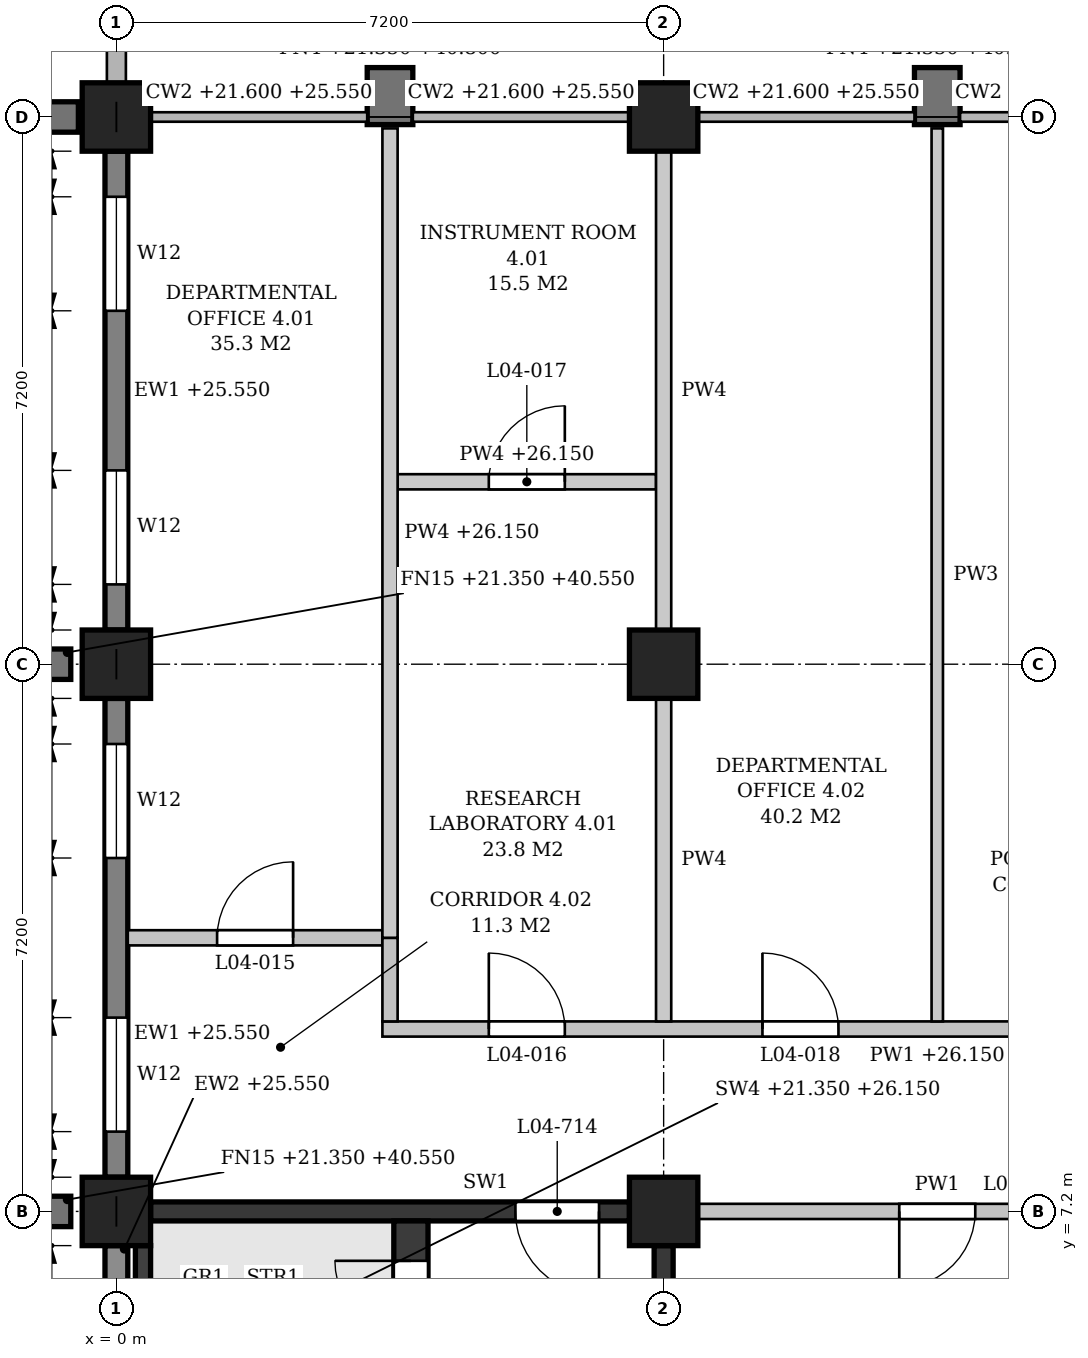
"""IFC4 building model, lengths in metres.
Left out: names, types, materials, properties, quantities, classifications, styles, units other than length and angle.
Written with IfcOpenShell. Run it as: python <this file> out.ifc"""

import sys

from ifc_helpers import new_model, si_unit, direction, frame, frame_2d, origin, origin_2d, place, context, subcontext, project, spatial, polyline, rectangle, outline, extrude, element, fill, save


model = new_model("IFC4")
c1 = context("Model", 3, precision=1e-05, world=origin(), true_north=direction((0.0, 1.0)))
c2 = subcontext(c1, "Body", "Model", "MODEL_VIEW")
j1 = project(units=[si_unit("LENGTHUNIT", "METRE"), si_unit("PLANEANGLEUNIT", "RADIAN")], contexts=[c1])
p1 = place(None, origin())
s1 = spatial("IfcSite", under=j1, at=p1, CompositionType="ELEMENT")
p2 = place(p1, origin())
s2 = spatial("IfcBuilding", under=s1, at=p2, CompositionType="ELEMENT")
p3 = place(p2, frame((0.0, 0.0, 21.6)))
s3 = spatial("IfcBuildingStorey", under=s2, at=p3, CompositionType="ELEMENT", Elevation=21.6)
for number, where, z_axis, x_axis in (
    (1, (0.0, 7.2, 0.0), (0.0, 0.0, 1.0), (1.0, 0.0, 0.0)),
    (2, (0.0, 14.4, 0.0), (0.0, 0.0, 1.0), (1.0, 0.0, 0.0)),
    (3, (0.0, 21.6, 0.0), (0.0, 0.0, 1.0), (1.0, 0.0, 0.0)),
    (4, (7.2, 7.2, 0.0), (0.0, 0.0, 1.0), (1.0, 0.0, 0.0)),
    (5, (7.2, 14.4, 0.0), (0.0, 0.0, 1.0), (1.0, 0.0, 0.0)),
    (6, (7.2, 21.6, 0.0), (0.0, 0.0, 1.0), (1.0, 0.0, 0.0)),
):
    element("IfcColumn", number, at=place(p3, frame(where, z_axis=z_axis, x_axis=x_axis)), inside=s3, PredefinedType="COLUMN", context=c2, shape_type="SweptSolid", body=[
        extrude(rectangle(XDim=0.9, YDim=0.9, at=origin_2d()), origin(), (0.0, 0.0, 1.0), 4.8),
    ])
p4 = place(p3, frame((0.0, 0.45, 0.0), z_axis=(0.0, 0.0, 1.0), x_axis=(0.0, 1.0, 0.0)))
e7 = element("IfcWall", 7, at=p4, inside=s3, PredefinedType="STANDARD", context=c2, shape_type="SweptSolid", body=[
    extrude(rectangle(XDim=6.3, YDim=0.3, at=frame_2d((3.15, 0.0))), origin(), (0.0, 0.0, 1.0), 3.95),
])
p5 = place(p4, frame((0.9, 0.0, 0.9)))
e8 = element("IfcOpeningElement", 8, at=p5, cuts=e7, PredefinedType="OPENING", context=c2, shape_type="SweptSolid", body=[
    extrude(outline(polyline([(0.0, 0.0), (0.9, 0.0), (0.9, 2.05), (0.45, 2.5), (0.0, 2.05), (0.0, 0.0)])), frame((0.0, 0.16, 0.0), z_axis=(0.0, -1.0, 0.0), x_axis=(1.0, 0.0, 0.0)), (0.0, 0.0, 1.0), 0.32),
])
p6 = place(p4, frame((4.5, 0.0, 0.9)))
e9 = element("IfcOpeningElement", 9, at=p6, cuts=e7, PredefinedType="OPENING", context=c2, shape_type="SweptSolid", body=[
    extrude(outline(polyline([(0.0, 0.0), (0.9, 0.0), (0.9, 2.05), (0.45, 2.5), (0.0, 2.05), (0.0, 0.0)])), frame((0.0, 0.16, 0.0), z_axis=(0.0, -1.0, 0.0), x_axis=(1.0, 0.0, 0.0)), (0.0, 0.0, 1.0), 0.32),
])
p7 = place(p3, frame((0.0, 7.65, 0.0), z_axis=(0.0, 0.0, 1.0), x_axis=(0.0, 1.0, 0.0)))
e10 = element("IfcWall", 10, at=p7, inside=s3, PredefinedType="STANDARD", context=c2, shape_type="SweptSolid", body=[
    extrude(rectangle(XDim=6.3, YDim=0.3, at=frame_2d((3.15, 0.0))), origin(), (0.0, 0.0, 1.0), 3.95),
])
p8 = place(p7, frame((0.6, 0.0, 0.9)))
e11 = element("IfcOpeningElement", 11, at=p8, cuts=e10, PredefinedType="OPENING", context=c2, shape_type="SweptSolid", body=[
    extrude(outline(polyline([(0.0, 0.0), (1.5, 0.0), (1.5, 1.75), (0.75, 2.5), (0.0, 1.75), (0.0, 0.0)])), frame((0.0, 0.16, 0.0), z_axis=(0.0, -1.0, 0.0), x_axis=(1.0, 0.0, 0.0)), (0.0, 0.0, 1.0), 0.32),
])
p9 = place(p7, frame((4.2, 0.0, 0.9)))
e12 = element("IfcOpeningElement", 12, at=p9, cuts=e10, PredefinedType="OPENING", context=c2, shape_type="SweptSolid", body=[
    extrude(outline(polyline([(0.0, 0.0), (1.5, 0.0), (1.5, 1.75), (0.75, 2.5), (0.0, 1.75), (0.0, 0.0)])), frame((0.0, 0.16, 0.0), z_axis=(0.0, -1.0, 0.0), x_axis=(1.0, 0.0, 0.0)), (0.0, 0.0, 1.0), 0.32),
])
p10 = place(p3, frame((0.0, 14.85, 0.0), z_axis=(0.0, 0.0, 1.0), x_axis=(0.0, 1.0, 0.0)))
e13 = element("IfcWall", 13, at=p10, inside=s3, PredefinedType="STANDARD", context=c2, shape_type="SweptSolid", body=[
    extrude(rectangle(XDim=6.3, YDim=0.3, at=frame_2d((3.15, 0.0))), origin(), (0.0, 0.0, 1.0), 3.95),
])
p11 = place(p10, frame((0.6, 0.0, 0.9)))
e14 = element("IfcOpeningElement", 14, at=p11, cuts=e13, PredefinedType="OPENING", context=c2, shape_type="SweptSolid", body=[
    extrude(outline(polyline([(0.0, 0.0), (1.5, 0.0), (1.5, 1.75), (0.75, 2.5), (0.0, 1.75), (0.0, 0.0)])), frame((0.0, 0.16, 0.0), z_axis=(0.0, -1.0, 0.0), x_axis=(1.0, 0.0, 0.0)), (0.0, 0.0, 1.0), 0.32),
])
p12 = place(p10, frame((4.2, 0.0, 0.9)))
e15 = element("IfcOpeningElement", 15, at=p12, cuts=e13, PredefinedType="OPENING", context=c2, shape_type="SweptSolid", body=[
    extrude(outline(polyline([(0.0, 0.0), (1.5, 0.0), (1.5, 1.75), (0.75, 2.5), (0.0, 1.75), (0.0, 0.0)])), frame((0.0, 0.16, 0.0), z_axis=(0.0, -1.0, 0.0), x_axis=(1.0, 0.0, 0.0)), (0.0, 0.0, 1.0), 0.32),
])
for number, where, z_axis, x_axis in (
    (16, (10.8, 21.5, -0.25), (0.0, 0.0, 1.0), (0.0, 1.0, 0.0)),
    (17, (3.6, 21.5, -0.25), (0.0, 0.0, 1.0), (0.0, 1.0, 0.0)),
):
    element("IfcWall", number, at=place(p3, frame(where, z_axis=z_axis, x_axis=x_axis)), inside=s3, PredefinedType="POLYGONAL", context=c2, shape_type="SweptSolid", body=[
        extrude(outline(polyline([(0.75, 0.0), (0.75, 19.0), (0.45, 19.45), (0.3, 19.45), (0.3, 18.6), (0.0, 18.6), (0.0, 14.65), (0.35, 14.65), (0.35, 13.8), (0.0, 13.8), (0.0, 9.85), (0.35, 9.85), (0.35, 9.0), (0.0, 9.0), (0.0, 5.05), (0.35, 5.05), (0.35, 4.2), (0.0, 4.2), (0.0, 0.25), (0.35, 0.25), (0.35, 0.0), (0.75, 0.0)])), frame((0.0, 0.3, 0.0), z_axis=(0.0, -1.0, 0.0), x_axis=(1.0, 0.0, 0.0)), (0.0, 0.0, 1.0), 0.6),
    ])
for number, where, z_axis, x_axis in (
    (18, (-0.6, 7.2, -0.25), (0.0, 0.0, 1.0), (-1.0, 0.0, 0.0)),
    (19, (-0.6, 14.4, -0.25), (0.0, 0.0, 1.0), (-1.0, 0.0, 0.0)),
):
    element("IfcWall", number, at=place(p3, frame(where, z_axis=z_axis, x_axis=x_axis)), inside=s3, PredefinedType="POLYGONAL", context=c2, shape_type="SweptSolid", body=[
        extrude(outline(polyline([(0.85, 0.0), (0.85, 18.9), (0.65, 19.2), (0.0, 19.2), (0.0, 0.0), (0.85, 0.0)])), frame((0.0, 0.2, 0.0), z_axis=(0.0, -1.0, 0.0), x_axis=(1.0, 0.0, 0.0)), (0.0, 0.0, 1.0), 0.4),
    ])
p13 = place(p3, frame((-0.5, 21.6, -0.25), z_axis=(0.0, 0.0, 1.0), x_axis=(-1.0, 0.0, 0.0)))
e20 = element("IfcWall", 20, at=p13, inside=s3, PredefinedType="POLYGONAL", context=c2, shape_type="SweptSolid", body=[
    extrude(outline(polyline([(0.6, 0.0), (0.6, 19.125), (0.55, 19.2), (0.0, 19.2), (0.0, 0.0), (0.6, 0.0)])), frame((0.0, 0.2, 0.0), z_axis=(0.0, -1.0, 0.0), x_axis=(1.0, 0.0, 0.0)), (0.0, 0.0, 1.0), 0.4),
])
p14 = place(p3, frame((0.45, 7.2, 0.0), z_axis=(0.0, 0.0, 1.0), x_axis=(1.0, 0.0, 0.0)))
e21 = element("IfcWall", 21, at=p14, inside=s3, PredefinedType="SHEAR", context=c2, shape_type="SweptSolid", body=[
    extrude(rectangle(XDim=6.3, YDim=0.25, at=frame_2d((3.15, 0.0))), origin(), (0.0, 0.0, 1.0), 3.8),
])
p15 = place(p14, frame((4.8, 0.0, 0.0)))
e22 = element("IfcOpeningElement", 22, at=p15, cuts=e21, PredefinedType="OPENING", context=c2, shape_type="SweptSolid", body=[
    extrude(rectangle(XDim=1.1, YDim=2.1, at=frame_2d((0.55, 1.05))), frame((0.0, 0.135, 0.0), z_axis=(0.0, -1.0, 0.0), x_axis=(1.0, 0.0, 0.0)), (0.0, 0.0, 1.0), 0.27),
])
p16 = place(p3, frame((7.2, 0.45, 0.0), z_axis=(0.0, 0.0, 1.0), x_axis=(0.0, 1.0, 0.0)))
e23 = element("IfcWall", 23, at=p16, inside=s3, PredefinedType="SHEAR", context=c2, shape_type="SweptSolid", body=[
    extrude(rectangle(XDim=6.3, YDim=0.25, at=frame_2d((3.15, 0.0))), origin(), (0.0, 0.0, 1.0), 3.8),
])
p17 = place(p3, frame((0.35, 5.85, -0.25), z_axis=(0.0, 0.0, 1.0), x_axis=(0.0, 1.0, 0.0)))
e24 = element("IfcWall", 24, at=p17, inside=s3, PredefinedType="SHEAR", context=c2, shape_type="SweptSolid", body=[
    extrude(rectangle(XDim=0.9, YDim=0.2, at=frame_2d((0.45, 0.0))), origin(), (0.0, 0.0, 1.0), 4.8),
])
p18 = place(p3, frame((3.875, 0.225, 0.0), z_axis=(0.0, 0.0, 1.0), x_axis=(0.0, 1.0, 0.0)))
e25 = element("IfcWall", 25, at=p18, inside=s3, PredefinedType="SHEAR", context=c2, shape_type="SweptSolid", body=[
    extrude(rectangle(XDim=6.85, YDim=0.45, at=frame_2d((3.425, 0.0))), origin(), (0.0, 0.0, 1.0), 4.55),
])
p19 = place(p18, frame((5.325, 0.0, 0.0)))
e26 = element("IfcOpeningElement", 26, at=p19, cuts=e25, PredefinedType="OPENING", context=c2, shape_type="SweptSolid", body=[
    extrude(rectangle(XDim=1.0, YDim=2.1, at=frame_2d((0.5, 1.05))), frame((0.0, 0.235, 0.0), z_axis=(0.0, -1.0, 0.0), x_axis=(1.0, 0.0, 0.0)), (0.0, 0.0, 1.0), 0.47),
])
p20 = place(p3, frame((7.65, 7.2, 0.0), z_axis=(0.0, 0.0, 1.0), x_axis=(1.0, 0.0, 0.0)))
e27 = element("IfcWall", 27, at=p20, inside=s3, PredefinedType="PARTITIONING", context=c2, shape_type="SweptSolid", body=[
    extrude(rectangle(XDim=6.3, YDim=0.2, at=frame_2d((3.15, 0.0))), origin(), (0.0, 0.0, 1.0), 3.8),
])
p21 = place(p20, frame((2.65, 0.0, 0.0)))
e28 = element("IfcOpeningElement", 28, at=p21, cuts=e27, PredefinedType="OPENING", context=c2, shape_type="SweptSolid", body=[
    extrude(rectangle(XDim=1.0, YDim=2.1, at=frame_2d((0.5, 1.05))), frame((0.0, 0.11, 0.0), z_axis=(0.0, -1.0, 0.0), x_axis=(1.0, 0.0, 0.0)), (0.0, 0.0, 1.0), 0.22),
])
p22 = place(p3, frame((3.5, 9.6, 0.0), z_axis=(0.0, 0.0, 1.0), x_axis=(1.0, 0.0, 0.0)))
e29 = element("IfcWall", 29, at=p22, inside=s3, PredefinedType="PARTITIONING", context=c2, shape_type="SweptSolid", body=[
    extrude(outline(polyline([(0.0, 0.0), (14.6, 0.0), (14.6, 4.55), (11.15, 4.55), (11.15, 3.8), (10.65, 3.8), (10.65, 4.55), (3.95, 4.55), (3.95, 3.8), (3.45, 3.8), (3.45, 4.55), (0.0, 4.55), (0.0, 0.0)])), frame((0.0, 0.1, 0.0), z_axis=(0.0, -1.0, 0.0), x_axis=(1.0, 0.0, 0.0)), (0.0, 0.0, 1.0), 0.2),
])
p23 = place(p22, frame((1.4, 0.0, 0.0)))
e30 = element("IfcOpeningElement", 30, at=p23, cuts=e29, PredefinedType="OPENING", context=c2, shape_type="SweptSolid", body=[
    extrude(rectangle(XDim=1.0, YDim=2.1, at=frame_2d((0.5, 1.05))), frame((0.0, 0.11, 0.0), z_axis=(0.0, -1.0, 0.0), x_axis=(1.0, 0.0, 0.0)), (0.0, 0.0, 1.0), 0.22),
])
p24 = place(p22, frame((5.0, 0.0, 0.0)))
e31 = element("IfcOpeningElement", 31, at=p24, cuts=e29, PredefinedType="OPENING", context=c2, shape_type="SweptSolid", body=[
    extrude(rectangle(XDim=1.0, YDim=2.1, at=frame_2d((0.5, 1.05))), frame((0.0, 0.11, 0.0), z_axis=(0.0, -1.0, 0.0), x_axis=(1.0, 0.0, 0.0)), (0.0, 0.0, 1.0), 0.22),
])
p25 = place(p3, frame((0.15, 10.8, 0.0), z_axis=(0.0, 0.0, 1.0), x_axis=(1.0, 0.0, 0.0)))
e32 = element("IfcWall", 32, at=p25, inside=s3, PredefinedType="PARTITIONING", context=c2, shape_type="SweptSolid", body=[
    extrude(outline(polyline([(0.0, 0.0), (3.35, 0.0), (3.35, 4.55), (0.1, 4.55), (0.1, 3.95), (0.0, 3.95), (0.0, 0.0)])), frame((0.0, 0.1, 0.0), z_axis=(0.0, -1.0, 0.0), x_axis=(1.0, 0.0, 0.0)), (0.0, 0.0, 1.0), 0.2),
])
p26 = place(p25, frame((1.175, 0.0, 0.0)))
e33 = element("IfcOpeningElement", 33, at=p26, cuts=e32, PredefinedType="OPENING", context=c2, shape_type="SweptSolid", body=[
    extrude(rectangle(XDim=1.0, YDim=2.1, at=frame_2d((0.5, 1.05))), frame((0.0, 0.11, 0.0), z_axis=(0.0, -1.0, 0.0), x_axis=(1.0, 0.0, 0.0)), (0.0, 0.0, 1.0), 0.22),
])
p27 = place(p3, frame((3.7, 16.8, 0.0), z_axis=(0.0, 0.0, 1.0), x_axis=(1.0, 0.0, 0.0)))
e34 = element("IfcWall", 34, at=p27, inside=s3, PredefinedType="PARTITIONING", context=c2, shape_type="SweptSolid", body=[
    extrude(outline(polyline([(0.0, 0.0), (3.4, 0.0), (3.4, 3.8), (3.25, 3.8), (3.25, 4.55), (0.0, 4.55), (0.0, 0.0)])), frame((0.0, 0.1, 0.0), z_axis=(0.0, -1.0, 0.0), x_axis=(1.0, 0.0, 0.0)), (0.0, 0.0, 1.0), 0.2),
])
p28 = place(p27, frame((1.2, 0.0, 0.0)))
e35 = element("IfcOpeningElement", 35, at=p28, cuts=e34, PredefinedType="OPENING", context=c2, shape_type="SweptSolid", body=[
    extrude(rectangle(XDim=1.0, YDim=2.1, at=frame_2d((0.5, 1.05))), frame((0.0, 0.11, 0.0), z_axis=(0.0, -1.0, 0.0), x_axis=(1.0, 0.0, 0.0)), (0.0, 0.0, 1.0), 0.22),
])
p29 = place(p3, frame((3.6, 9.7, 0.0), z_axis=(0.0, 0.0, 1.0), x_axis=(0.0, 1.0, 0.0)))
e36 = element("IfcWall", 36, at=p29, inside=s3, PredefinedType="PARTITIONING", context=c2, shape_type="SweptSolid", body=[
    extrude(rectangle(XDim=1.1, YDim=0.2, at=frame_2d((0.55, 0.0))), origin(), (0.0, 0.0, 1.0), 4.55),
])
p30 = place(p3, frame((3.6, 10.8, 0.0), z_axis=(0.0, 0.0, 1.0), x_axis=(0.0, 1.0, 0.0)))
e37 = element("IfcWall", 37, at=p30, inside=s3, PredefinedType="PARTITIONING", context=c2, shape_type="SweptSolid", body=[
    extrude(outline(polyline([(0.0, 0.0), (10.65, 0.0), (10.65, 3.95), (10.55, 3.95), (10.55, 4.55), (3.85, 4.55), (3.85, 3.8), (3.35, 3.8), (3.35, 4.55), (0.0, 4.55), (0.0, 0.0)])), frame((0.0, 0.1, 0.0), z_axis=(0.0, -1.0, 0.0), x_axis=(1.0, 0.0, 0.0)), (0.0, 0.0, 1.0), 0.2),
])
p31 = place(p3, frame((7.2, 9.7, 0.0), z_axis=(0.0, 0.0, 1.0), x_axis=(0.0, 1.0, 0.0)))
e38 = element("IfcWall", 38, at=p31, inside=s3, PredefinedType="PARTITIONING", context=c2, shape_type="SweptSolid", body=[
    extrude(rectangle(XDim=4.25, YDim=0.2, at=frame_2d((2.125, 0.0))), origin(), (0.0, 0.0, 1.0), 3.8),
])
p32 = place(p3, frame((7.2, 14.85, 0.0), z_axis=(0.0, 0.0, 1.0), x_axis=(0.0, 1.0, 0.0)))
e39 = element("IfcWall", 39, at=p32, inside=s3, PredefinedType="PARTITIONING", context=c2, shape_type="SweptSolid", body=[
    extrude(rectangle(XDim=6.3, YDim=0.2, at=frame_2d((3.15, 0.0))), origin(), (0.0, 0.0, 1.0), 3.8),
])
p33 = place(p3, frame((10.8, 9.7, 0.0), z_axis=(0.0, 0.0, 1.0), x_axis=(0.0, 1.0, 0.0)))
e40 = element("IfcWall", 40, at=p33, inside=s3, PredefinedType="PARTITIONING", context=c2, shape_type="SweptSolid", body=[
    extrude(rectangle(XDim=11.75, YDim=0.15, at=frame_2d((5.875, 0.0))), origin(), (0.0, 0.0, 1.0), 3.8),
])
p34 = place(p8, origin())
e41 = element("IfcWindow", 41, at=p34, inside=s3, PartitioningType="SINGLE_PANEL", PredefinedType="WINDOW", context=c2, shape_type="SweptSolid", body=[
    extrude(outline(polyline([(0.0, 0.0), (1.5, 0.0), (1.5, 1.75), (0.75, 2.5), (0.0, 1.75), (0.0, 0.0)])), frame((0.0, 0.03, 0.0), z_axis=(0.0, -1.0, 0.0), x_axis=(1.0, 0.0, 0.0)), (0.0, 0.0, 1.0), 0.06),
])
fill(e11, e41)
p35 = place(p9, origin())
e42 = element("IfcWindow", 42, at=p35, inside=s3, PartitioningType="SINGLE_PANEL", PredefinedType="WINDOW", context=c2, shape_type="SweptSolid", body=[
    extrude(outline(polyline([(0.0, 0.0), (1.5, 0.0), (1.5, 1.75), (0.75, 2.5), (0.0, 1.75), (0.0, 0.0)])), frame((0.0, 0.03, 0.0), z_axis=(0.0, -1.0, 0.0), x_axis=(1.0, 0.0, 0.0)), (0.0, 0.0, 1.0), 0.06),
])
fill(e12, e42)
p36 = place(p11, origin())
e43 = element("IfcWindow", 43, at=p36, inside=s3, PartitioningType="SINGLE_PANEL", PredefinedType="WINDOW", context=c2, shape_type="SweptSolid", body=[
    extrude(outline(polyline([(0.0, 0.0), (1.5, 0.0), (1.5, 1.75), (0.75, 2.5), (0.0, 1.75), (0.0, 0.0)])), frame((0.0, 0.03, 0.0), z_axis=(0.0, -1.0, 0.0), x_axis=(1.0, 0.0, 0.0)), (0.0, 0.0, 1.0), 0.06),
])
fill(e14, e43)
p37 = place(p12, origin())
e44 = element("IfcWindow", 44, at=p37, inside=s3, PartitioningType="SINGLE_PANEL", PredefinedType="WINDOW", context=c2, shape_type="SweptSolid", body=[
    extrude(outline(polyline([(0.0, 0.0), (1.5, 0.0), (1.5, 1.75), (0.75, 2.5), (0.0, 1.75), (0.0, 0.0)])), frame((0.0, 0.03, 0.0), z_axis=(0.0, -1.0, 0.0), x_axis=(1.0, 0.0, 0.0)), (0.0, 0.0, 1.0), 0.06),
])
fill(e15, e44)
p38 = place(p19, origin())
e45 = element("IfcDoor", 45, at=p38, inside=s3, OperationType="SINGLE_SWING_RIGHT", PredefinedType="DOOR", context=c2, shape_type="SweptSolid", body=[
    extrude(rectangle(XDim=1.0, YDim=2.1, at=frame_2d((0.5, 1.05))), frame((0.0, 0.025, 0.0), z_axis=(0.0, -1.0, 0.0), x_axis=(1.0, 0.0, 0.0)), (0.0, 0.0, 1.0), 0.05),
])
fill(e26, e45)
p39 = place(p15, frame((1.1, 0.0, 0.0), z_axis=(0.0, 0.0, 1.0), x_axis=(-1.0, 0.0, 0.0)))
e46 = element("IfcDoor", 46, at=p39, inside=s3, OperationType="SINGLE_SWING_LEFT", PredefinedType="DOOR", context=c2, shape_type="SweptSolid", body=[
    extrude(rectangle(XDim=1.1, YDim=2.1, at=frame_2d((0.55, 1.05))), frame((0.0, 0.025, 0.0), z_axis=(0.0, -1.0, 0.0), x_axis=(1.0, 0.0, 0.0)), (0.0, 0.0, 1.0), 0.05),
])
fill(e22, e46)
p40 = place(p21, frame((1.0, 0.0, 0.0), z_axis=(0.0, 0.0, 1.0), x_axis=(-1.0, 0.0, 0.0)))
e47 = element("IfcDoor", 47, at=p40, inside=s3, OperationType="SINGLE_SWING_RIGHT", PredefinedType="DOOR", context=c2, shape_type="SweptSolid", body=[
    extrude(rectangle(XDim=1.0, YDim=2.1, at=frame_2d((0.5, 1.05))), frame((0.0, 0.025, 0.0), z_axis=(0.0, -1.0, 0.0), x_axis=(1.0, 0.0, 0.0)), (0.0, 0.0, 1.0), 0.05),
])
fill(e28, e47)
p41 = place(p26, origin())
e48 = element("IfcDoor", 48, at=p41, inside=s3, OperationType="SINGLE_SWING_RIGHT", PredefinedType="DOOR", context=c2, shape_type="SweptSolid", body=[
    extrude(rectangle(XDim=1.0, YDim=2.1, at=frame_2d((0.5, 1.05))), frame((0.0, 0.025, 0.0), z_axis=(0.0, -1.0, 0.0), x_axis=(1.0, 0.0, 0.0)), (0.0, 0.0, 1.0), 0.05),
])
fill(e33, e48)
p42 = place(p23, origin())
e49 = element("IfcDoor", 49, at=p42, inside=s3, OperationType="SINGLE_SWING_LEFT", PredefinedType="DOOR", context=c2, shape_type="SweptSolid", body=[
    extrude(rectangle(XDim=1.0, YDim=2.1, at=frame_2d((0.5, 1.05))), frame((0.0, 0.025, 0.0), z_axis=(0.0, -1.0, 0.0), x_axis=(1.0, 0.0, 0.0)), (0.0, 0.0, 1.0), 0.05),
])
fill(e30, e49)
p43 = place(p28, origin())
e50 = element("IfcDoor", 50, at=p43, inside=s3, OperationType="SINGLE_SWING_RIGHT", PredefinedType="DOOR", context=c2, shape_type="SweptSolid", body=[
    extrude(rectangle(XDim=1.0, YDim=2.1, at=frame_2d((0.5, 1.05))), frame((0.0, 0.025, 0.0), z_axis=(0.0, -1.0, 0.0), x_axis=(1.0, 0.0, 0.0)), (0.0, 0.0, 1.0), 0.05),
])
fill(e35, e50)
p44 = place(p24, origin())
e51 = element("IfcDoor", 51, at=p44, inside=s3, OperationType="SINGLE_SWING_LEFT", PredefinedType="DOOR", context=c2, shape_type="SweptSolid", body=[
    extrude(rectangle(XDim=1.0, YDim=2.1, at=frame_2d((0.5, 1.05))), frame((0.0, 0.025, 0.0), z_axis=(0.0, -1.0, 0.0), x_axis=(1.0, 0.0, 0.0)), (0.0, 0.0, 1.0), 0.05),
])
fill(e31, e51)
save(model, sys.argv[1])
